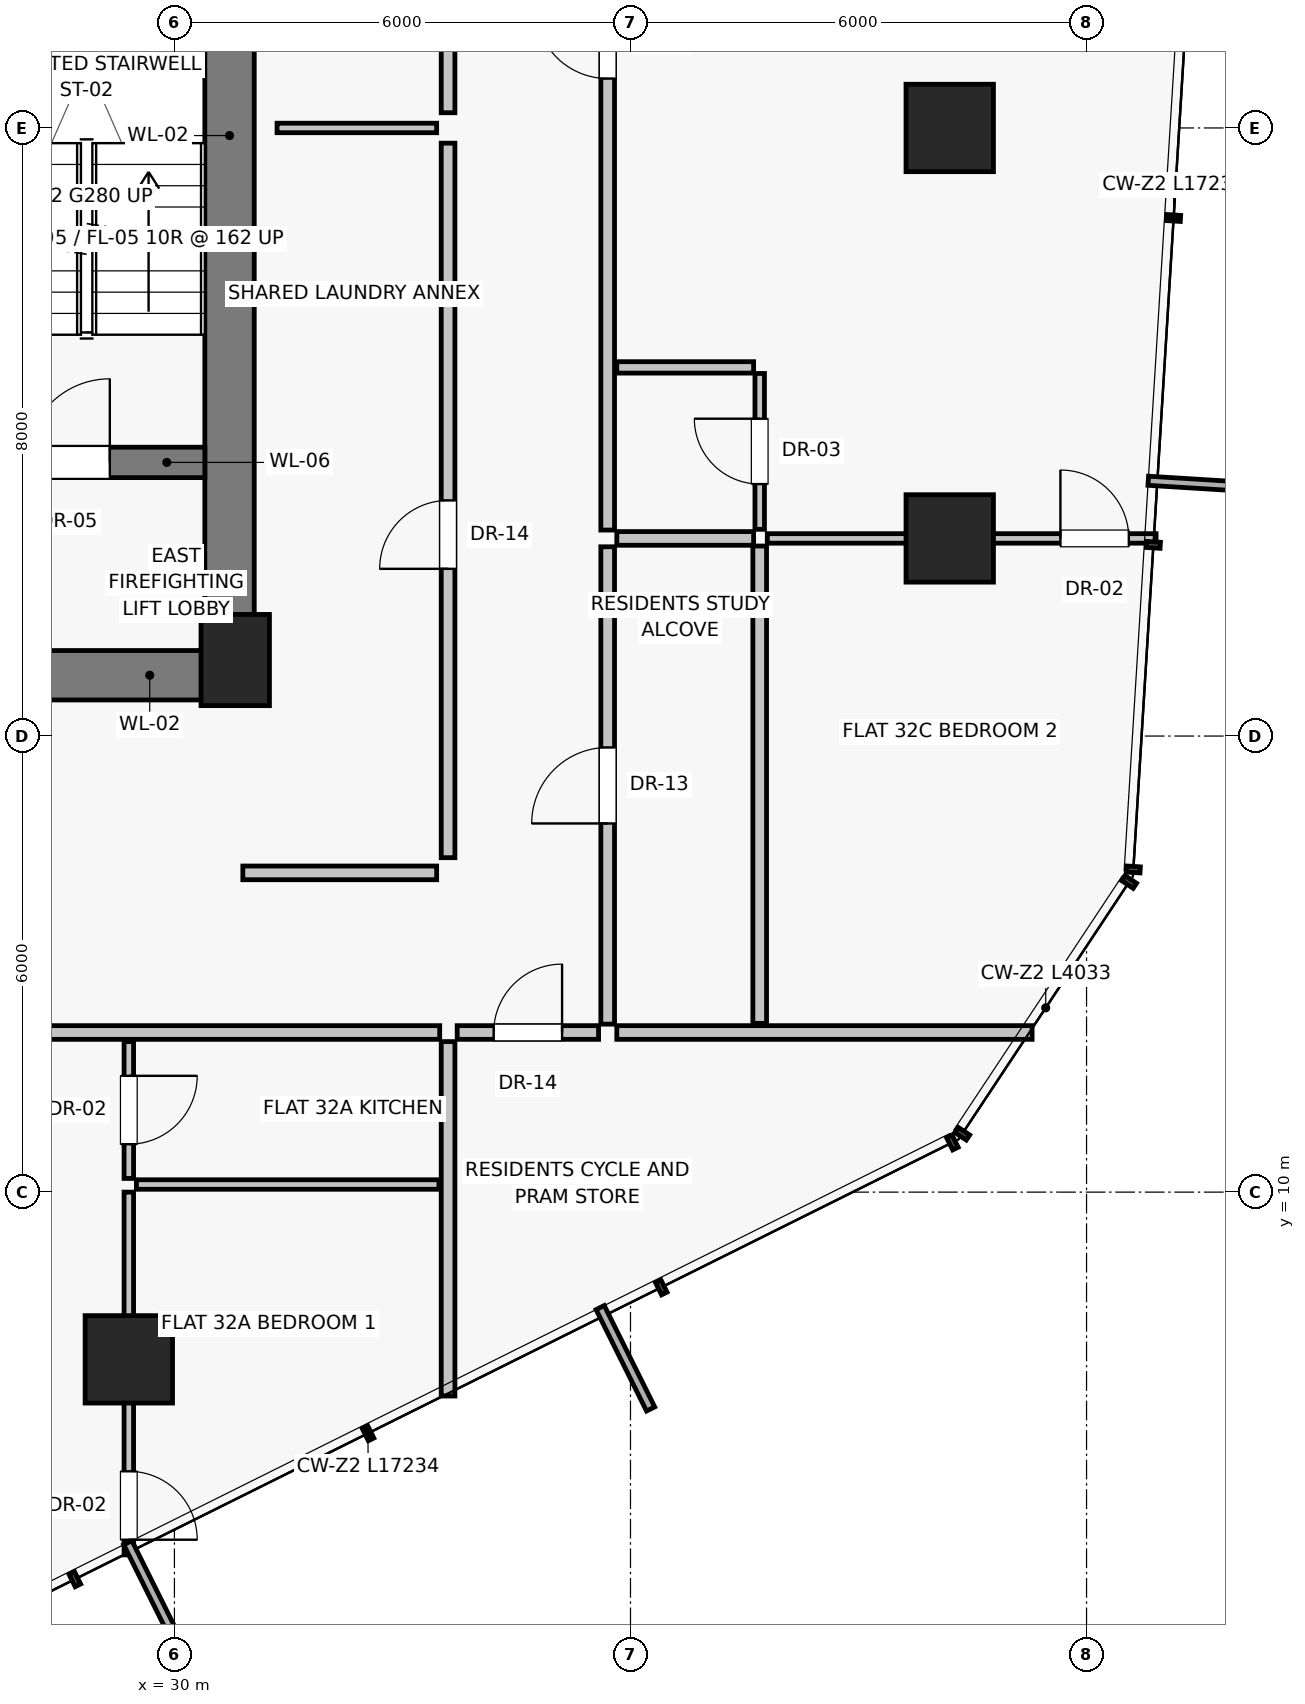
"""IFC4 building model, lengths in metres.
Left out: names, types, materials, properties, quantities, classifications, styles, units other than length and angle.
Written with IfcOpenShell. Run it as: python <this file> out.ifc"""

import sys

from ifc_helpers import new_model, si_unit, direction, frame, frame_2d, origin, origin_2d, place, context, subcontext, project, spatial, rectangle, extrude, source, transform, mapped, element, fill, save


model = new_model("IFC4")
c1 = context("Model", 3, precision=1e-05, world=origin(), true_north=direction((0.0, 1.0)))
c2 = subcontext(c1, "Body", "Model", "MODEL_VIEW")
j1 = project(units=[si_unit("LENGTHUNIT", "METRE"), si_unit("PLANEANGLEUNIT", "RADIAN")], contexts=[c1])
p1 = place(None, origin())
s1 = spatial("IfcSite", under=j1, at=p1, CompositionType="ELEMENT")
p2 = place(p1, origin())
s2 = spatial("IfcBuilding", under=s1, at=p2, CompositionType="ELEMENT")
p3 = place(p2, frame((0.0, 0.0, 116.5)))
s3 = spatial("IfcBuildingStorey", under=s2, at=p3, CompositionType="ELEMENT", Elevation=116.5)
p4 = place(p3, frame((30.8, 17.0, 0.0), z_axis=(0.0, 0.0, 1.0), x_axis=(1.0, 0.0, 0.0)))
e1 = element("IfcColumn", 1, at=p4, inside=s3, PredefinedType="PILASTER", context=c2, shape_type="SweptSolid", body=[
    extrude(rectangle(XDim=0.9, YDim=1.2, at=origin_2d()), origin(), (0.0, 0.0, 1.0), 3.25),
])
for number, where, z_axis, x_axis in (
    (2, (40.2, 18.6, 0.0), (0.0, 0.0, 1.0), (1.0, 0.0, 0.0)),
    (3, (40.2, 24.0, 0.0), (0.0, 0.0, 1.0), (1.0, 0.0, 0.0)),
    (4, (29.4, 7.8, 0.0), (0.0, 0.0, 1.0), (1.0, 0.0, 0.0)),
):
    element("IfcColumn", number, at=place(p3, frame(where, z_axis=z_axis, x_axis=x_axis)), inside=s3, PredefinedType="COLUMN", context=c2, shape_type="SweptSolid", body=[
        extrude(rectangle(XDim=1.15, YDim=1.15, at=origin_2d()), origin(), (0.0, 0.0, 1.0), 3.25),
    ])
p5 = place(p3, frame((30.725, 16.8, 0.0), z_axis=(0.0, 0.0, 1.0), x_axis=(0.0, 1.0, 0.0)))
e5 = element("IfcWall", 5, at=p5, inside=s3, PredefinedType="SHEAR", context=c2, shape_type="SweptSolid", body=[
    extrude(rectangle(XDim=14.2, YDim=0.65, at=frame_2d((7.1, 0.0))), origin(), (0.0, 0.0, 1.0), 3.0),
])
p6 = place(p3, frame((24.95, 16.8, 0.0), z_axis=(0.0, 0.0, 1.0), x_axis=(1.0, 0.0, 0.0)))
e6 = element("IfcWall", 6, at=p6, inside=s3, PredefinedType="SHEAR", context=c2, shape_type="SweptSolid", body=[
    extrude(rectangle(XDim=5.85, YDim=0.65, at=frame_2d((2.925, 0.0))), origin(), (0.0, 0.0, 1.0), 3.0),
])
p7 = place(p6, frame((2.15, 0.0, 0.0)))
e7 = element("IfcOpeningElement", 7, at=p7, cuts=e6, PredefinedType="OPENING", context=c2, shape_type="SweptSolid", body=[
    extrude(rectangle(XDim=1.2, YDim=2.03, at=frame_2d((0.6, 1.015))), frame((0.0, 0.335, 0.0), z_axis=(0.0, -1.0, 0.0), x_axis=(1.0, 0.0, 0.0)), (0.0, 0.0, 1.0), 0.67),
])
p8 = place(p3, frame((27.0, 19.6, 0.0), z_axis=(0.0, 0.0, 1.0), x_axis=(1.0, 0.0, 0.0)))
e8 = element("IfcWall", 8, at=p8, inside=s3, PredefinedType="SHEAR", context=c2, shape_type="SweptSolid", body=[
    extrude(rectangle(XDim=3.4, YDim=0.4, at=frame_2d((1.7, 0.0))), origin(), (0.0, 0.0, 1.0), 3.0),
])
p9 = place(p8, frame((1.05, 0.0, 0.0)))
e9 = element("IfcOpeningElement", 9, at=p9, cuts=e8, PredefinedType="OPENING", context=c2, shape_type="SweptSolid", body=[
    extrude(rectangle(XDim=1.1, YDim=2.03, at=frame_2d((0.55, 1.015))), frame((0.0, 0.21, 0.0), z_axis=(0.0, -1.0, 0.0), x_axis=(1.0, 0.0, 0.0)), (0.0, 0.0, 1.0), 0.42),
])
p10 = place(p3, frame((33.6, 14.4, 0.0), z_axis=(0.0, 0.0, 1.0), x_axis=(0.0, 1.0, 0.0)))
e10 = element("IfcWall", 10, at=p10, inside=s3, PredefinedType="PARTITIONING", context=c2, shape_type="SweptSolid", body=[
    extrude(rectangle(XDim=9.4, YDim=0.18, at=frame_2d((4.7, 0.0))), origin(), (0.0, 0.0, 1.0), 3.0),
])
p11 = place(p10, frame((3.8, 0.0, 0.0)))
e11 = element("IfcOpeningElement", 11, at=p11, cuts=e10, PredefinedType="OPENING", context=c2, shape_type="SweptSolid", body=[
    extrude(rectangle(XDim=0.9, YDim=2.01, at=frame_2d((0.45, 1.005))), frame((0.0, 0.1, 0.0), z_axis=(0.0, -1.0, 0.0), x_axis=(1.0, 0.0, 0.0)), (0.0, 0.0, 1.0), 0.2),
])
p12 = place(p3, frame((33.6, 24.2, 0.0), z_axis=(0.0, 0.0, 1.0), x_axis=(0.0, 1.0, 0.0)))
e12 = element("IfcWall", 12, at=p12, inside=s3, PredefinedType="PARTITIONING", context=c2, shape_type="SweptSolid", body=[
    extrude(rectangle(XDim=9.2, YDim=0.18, at=frame_2d((4.6, 0.0))), origin(), (0.0, 0.0, 1.0), 3.0),
])
p13 = place(p12, frame((3.8, 0.0, 0.0)))
e13 = element("IfcOpeningElement", 13, at=p13, cuts=e12, PredefinedType="OPENING", context=c2, shape_type="SweptSolid", body=[
    extrude(rectangle(XDim=0.9, YDim=2.01, at=frame_2d((0.45, 1.005))), frame((0.0, 0.1, 0.0), z_axis=(0.0, -1.0, 0.0), x_axis=(1.0, 0.0, 0.0)), (0.0, 0.0, 1.0), 0.2),
])
p14 = place(p3, frame((31.35, 24.0, 0.0), z_axis=(0.0, 0.0, 1.0), x_axis=(1.0, 0.0, 0.0)))
e14 = element("IfcWall", 14, at=p14, inside=s3, PredefinedType="PARTITIONING", context=c2, shape_type="SweptSolid", body=[
    extrude(rectangle(XDim=2.1, YDim=0.125, at=frame_2d((1.05, 0.0))), origin(), (0.0, 0.0, 1.0), 3.0),
])
p15 = place(p3, frame((30.9, 14.2, 0.0), z_axis=(0.0, 0.0, 1.0), x_axis=(1.0, 0.0, 0.0)))
e15 = element("IfcWall", 15, at=p15, inside=s3, PredefinedType="PARTITIONING", context=c2, shape_type="SweptSolid", body=[
    extrude(rectangle(XDim=2.55, YDim=0.18, at=frame_2d((1.275, 0.0))), origin(), (0.0, 0.0, 1.0), 3.0),
])
p16 = place(p3, frame((33.6, 11.98, 0.0), z_axis=(0.0, 0.0, 1.0), x_axis=(0.0, -1.0, 0.0)))
e16 = element("IfcWall", 16, at=p16, inside=s3, PredefinedType="PARTITIONING", context=c2, shape_type="SweptSolid", body=[
    extrude(rectangle(XDim=4.663, YDim=0.18, at=frame_2d((2.331, 0.0))), origin(), (0.0, 0.0, 1.0), 3.0),
])
p17 = place(p3, frame((18.71, 12.1, 0.0), z_axis=(0.0, 0.0, 1.0), x_axis=(1.0, 0.0, 0.0)))
e17 = element("IfcWall", 17, at=p17, inside=s3, PredefinedType="PARTITIONING", context=c2, shape_type="SweptSolid", body=[
    extrude(rectangle(XDim=14.78, YDim=0.18, at=frame_2d((7.39, 0.0))), origin(), (0.0, 0.0, 1.0), 2.58),
])
p18 = place(p17, frame((5.94, 0.0, 0.0)))
e18 = element("IfcOpeningElement", 18, at=p18, cuts=e17, PredefinedType="OPENING", context=c2, shape_type="SweptSolid", body=[
    extrude(rectangle(XDim=0.95, YDim=2.02, at=frame_2d((0.475, 1.01))), frame((0.0, 0.1, 0.0), z_axis=(0.0, -1.0, 0.0), x_axis=(1.0, 0.0, 0.0)), (0.0, 0.0, 1.0), 0.2),
])
p19 = place(p3, frame((29.4, 11.98, 0.0), z_axis=(0.0, 0.0, 1.0), x_axis=(0.0, -1.0, 0.0)))
e19 = element("IfcWall", 19, at=p19, inside=s3, PredefinedType="PARTITIONING", context=c2, shape_type="SweptSolid", body=[
    extrude(rectangle(XDim=1.8, YDim=0.125, at=frame_2d((0.9, 0.0))), origin(), (0.0, 0.0, 1.0), 2.378),
])
p20 = place(p19, frame((0.45, 0.0, 0.0)))
e20 = element("IfcOpeningElement", 20, at=p20, cuts=e19, PredefinedType="OPENING", context=c2, shape_type="SweptSolid", body=[
    extrude(rectangle(XDim=0.9, YDim=2.01, at=frame_2d((0.45, 1.005))), frame((0.0, 0.073, 0.0), z_axis=(0.0, -1.0, 0.0), x_axis=(1.0, 0.0, 0.0)), (0.0, 0.0, 1.0), 0.145),
])
p21 = place(p3, frame((29.5, 10.1, 0.0), z_axis=(0.0, 0.0, 1.0), x_axis=(1.0, 0.0, 0.0)))
e21 = element("IfcWall", 21, at=p21, inside=s3, PredefinedType="PARTITIONING", context=c2, shape_type="SweptSolid", body=[
    extrude(rectangle(XDim=3.98, YDim=0.125, at=frame_2d((1.99, 0.0))), origin(), (0.0, 0.0, 1.0), 3.0),
])
p22 = place(p3, frame((29.4, 10.0, 0.0), z_axis=(0.0, 0.0, 1.0), x_axis=(0.0, -1.0, 0.0)))
e22 = element("IfcWall", 22, at=p22, inside=s3, PredefinedType="PARTITIONING", context=c2, shape_type="SweptSolid", body=[
    extrude(rectangle(XDim=4.773, YDim=0.125, at=frame_2d((2.386, 0.0))), origin(), (0.0, 0.0, 1.0), 2.378),
])
p23 = place(p22, frame((3.673, 0.0, 0.0)))
e23 = element("IfcOpeningElement", 23, at=p23, cuts=e22, PredefinedType="OPENING", context=c2, shape_type="SweptSolid", body=[
    extrude(rectangle(XDim=0.9, YDim=2.01, at=frame_2d((0.45, 1.005))), frame((0.0, 0.073, 0.0), z_axis=(0.0, -1.0, 0.0), x_axis=(1.0, 0.0, 0.0)), (0.0, 0.0, 1.0), 0.145),
])
p24 = place(p3, frame((35.82, 12.1, 0.0), z_axis=(0.0, 0.0, 1.0), x_axis=(1.0, 0.0, 0.0)))
e24 = element("IfcWall", 24, at=p24, inside=s3, PredefinedType="PARTITIONING", context=c2, shape_type="SweptSolid", body=[
    extrude(rectangle(XDim=5.464, YDim=0.18, at=frame_2d((2.732, 0.0))), origin(), (0.0, 0.0, 1.0), 3.0),
])
p25 = place(p3, frame((35.7, 12.21, 0.0), z_axis=(0.0, 0.0, 1.0), x_axis=(0.0, 1.0, 0.0)))
e25 = element("IfcWall", 25, at=p25, inside=s3, PredefinedType="PARTITIONING", context=c2, shape_type="SweptSolid", body=[
    extrude(rectangle(XDim=6.28, YDim=0.18, at=frame_2d((3.14, 0.0))), origin(), (0.0, 0.0, 1.0), 2.58),
])
p26 = place(p25, frame((2.64, 0.0, 0.0)))
e26 = element("IfcOpeningElement", 26, at=p26, cuts=e25, PredefinedType="OPENING", context=c2, shape_type="SweptSolid", body=[
    extrude(rectangle(XDim=1.0, YDim=2.01, at=frame_2d((0.5, 1.005))), frame((0.0, 0.1, 0.0), z_axis=(0.0, -1.0, 0.0), x_axis=(1.0, 0.0, 0.0)), (0.0, 0.0, 1.0), 0.2),
])
p27 = place(p3, frame((35.7, 18.71, 0.0), z_axis=(0.0, 0.0, 1.0), x_axis=(0.0, 1.0, 0.0)))
e27 = element("IfcWall", 27, at=p27, inside=s3, PredefinedType="PARTITIONING", context=c2, shape_type="SweptSolid", body=[
    extrude(rectangle(XDim=16.88, YDim=0.18, at=frame_2d((8.44, 0.0))), origin(), (0.0, 0.0, 1.0), 2.58),
])
p28 = place(p27, frame((5.94, 0.0, 0.0)))
e28 = element("IfcOpeningElement", 28, at=p28, cuts=e27, PredefinedType="OPENING", context=c2, shape_type="SweptSolid", body=[
    extrude(rectangle(XDim=0.95, YDim=2.02, at=frame_2d((0.475, 1.01))), frame((0.0, 0.1, 0.0), z_axis=(0.0, -1.0, 0.0), x_axis=(1.0, 0.0, 0.0)), (0.0, 0.0, 1.0), 0.2),
])
p29 = place(p3, frame((37.7, 12.22, 0.0), z_axis=(0.0, 0.0, 1.0), x_axis=(0.0, 1.0, 0.0)))
e29 = element("IfcWall", 29, at=p29, inside=s3, PredefinedType="PARTITIONING", context=c2, shape_type="SweptSolid", body=[
    extrude(rectangle(XDim=6.28, YDim=0.18, at=frame_2d((3.14, 0.0))), origin(), (0.0, 0.0, 1.0), 3.0),
])
p30 = place(p3, frame((35.82, 18.6, 0.0), z_axis=(0.0, 0.0, 1.0), x_axis=(1.0, 0.0, 0.0)))
e30 = element("IfcWall", 30, at=p30, inside=s3, PredefinedType="PARTITIONING", context=c2, shape_type="SweptSolid", body=[
    extrude(rectangle(XDim=1.8, YDim=0.18, at=frame_2d((0.9, 0.0))), origin(), (0.0, 0.0, 1.0), 2.378),
])
p31 = place(p3, frame((37.8, 18.6, 0.0), z_axis=(0.0, 0.0, 1.0), x_axis=(1.0, 0.0, 0.0)))
e31 = element("IfcWall", 31, at=p31, inside=s3, PredefinedType="PARTITIONING", context=c2, shape_type="SweptSolid", body=[
    extrude(rectangle(XDim=5.115, YDim=0.125, at=frame_2d((2.558, 0.0))), origin(), (0.0, 0.0, 1.0), 2.378),
])
p32 = place(p31, frame((3.856, 0.0, 0.0)))
e32 = element("IfcOpeningElement", 32, at=p32, cuts=e31, PredefinedType="OPENING", context=c2, shape_type="SweptSolid", body=[
    extrude(rectangle(XDim=0.9, YDim=2.01, at=frame_2d((0.45, 1.005))), frame((0.0, 0.073, 0.0), z_axis=(0.0, -1.0, 0.0), x_axis=(1.0, 0.0, 0.0)), (0.0, 0.0, 1.0), 0.145),
])
p33 = place(p3, frame((35.82, 20.85, 0.0), z_axis=(0.0, 0.0, 1.0), x_axis=(1.0, 0.0, 0.0)))
e33 = element("IfcWall", 33, at=p33, inside=s3, PredefinedType="PARTITIONING", context=c2, shape_type="SweptSolid", body=[
    extrude(rectangle(XDim=1.8, YDim=0.15, at=frame_2d((0.9, 0.0))), origin(), (0.0, 0.0, 1.0), 3.0),
])
p34 = place(p3, frame((37.7, 18.72, 0.0), z_axis=(0.0, 0.0, 1.0), x_axis=(0.0, 1.0, 0.0)))
e34 = element("IfcWall", 34, at=p34, inside=s3, PredefinedType="PARTITIONING", context=c2, shape_type="SweptSolid", body=[
    extrude(rectangle(XDim=2.05, YDim=0.125, at=frame_2d((1.025, 0.0))), origin(), (0.0, 0.0, 1.0), 3.0),
])
p35 = place(p34, frame((0.595, 0.0, 0.0)))
e35 = element("IfcOpeningElement", 35, at=p35, cuts=e34, PredefinedType="OPENING", context=c2, shape_type="SweptSolid", body=[
    extrude(rectangle(XDim=0.86, YDim=2.01, at=frame_2d((0.43, 1.005))), frame((0.0, 0.073, 0.0), z_axis=(0.0, -1.0, 0.0), x_axis=(1.0, 0.0, 0.0)), (0.0, 0.0, 1.0), 0.145),
])
p36 = place(p3, frame((33.72, 12.1, 0.0), z_axis=(0.0, 0.0, 1.0), x_axis=(1.0, 0.0, 0.0)))
e36 = element("IfcWall", 36, at=p36, inside=s3, PredefinedType="PARTITIONING", context=c2, shape_type="SweptSolid", body=[
    extrude(rectangle(XDim=1.86, YDim=0.18, at=frame_2d((0.93, 0.0))), origin(), (0.0, 0.0, 1.0), 3.0),
])
p37 = place(p36, frame((0.48, 0.0, 0.0)))
e37 = element("IfcOpeningElement", 37, at=p37, cuts=e36, PredefinedType="OPENING", context=c2, shape_type="SweptSolid", body=[
    extrude(rectangle(XDim=0.9, YDim=2.01, at=frame_2d((0.45, 1.005))), frame((0.0, 0.1, 0.0), z_axis=(0.0, -1.0, 0.0), x_axis=(1.0, 0.0, 0.0)), (0.0, 0.0, 1.0), 0.2),
])
m1 = source(origin(), c2, "Body", "SweptSolid", [
    extrude(rectangle(XDim=1.1, YDim=2.03, at=frame_2d((0.55, 1.015))), frame((0.0, 0.025, 0.0), z_axis=(0.0, -1.0, 0.0), x_axis=(1.0, 0.0, 0.0)), (0.0, 0.0, 1.0), 0.05),
])
p38 = place(p9, origin())
e38 = element("IfcDoor", 38, at=p38, inside=s3, OperationType="SINGLE_SWING_RIGHT", PredefinedType="DOOR", context=c2, shape_type="MappedRepresentation", body=[
    mapped(m1, transform((0.0, 0.0, 0.0), scale=1.0)),
])
fill(e9, e38)
m2 = source(origin(), c2, "Body", "SweptSolid", [
    extrude(rectangle(XDim=0.9, YDim=2.01, at=frame_2d((0.45, 1.005))), frame((0.0, 0.025, 0.0), z_axis=(0.0, -1.0, 0.0), x_axis=(1.0, 0.0, 0.0)), (0.0, 0.0, 1.0), 0.05),
])
p39 = place(p11, origin())
e39 = element("IfcDoor", 39, at=p39, inside=s3, OperationType="SINGLE_SWING_LEFT", PredefinedType="DOOR", context=c2, shape_type="MappedRepresentation", body=[
    mapped(m2, transform((0.0, 0.0, 0.0), scale=1.0)),
])
fill(e11, e39)
p40 = place(p20, origin())
e40 = element("IfcDoor", 40, at=p40, inside=s3, OperationType="SINGLE_SWING_LEFT", PredefinedType="DOOR", context=c2, shape_type="MappedRepresentation", body=[
    mapped(m2, transform((0.0, 0.0, 0.0), scale=1.0)),
])
fill(e20, e40)
p41 = place(p23, origin())
e41 = element("IfcDoor", 41, at=p41, inside=s3, OperationType="SINGLE_SWING_RIGHT", PredefinedType="DOOR", context=c2, shape_type="MappedRepresentation", body=[
    mapped(m2, transform((0.0, 0.0, 0.0), scale=1.0)),
])
fill(e23, e41)
m3 = source(origin(), c2, "Body", "SweptSolid", [
    extrude(rectangle(XDim=1.0, YDim=2.01, at=frame_2d((0.5, 1.005))), frame((0.0, 0.025, 0.0), z_axis=(0.0, -1.0, 0.0), x_axis=(1.0, 0.0, 0.0)), (0.0, 0.0, 1.0), 0.05),
])
p42 = place(p26, origin())
e42 = element("IfcDoor", 42, at=p42, inside=s3, OperationType="SINGLE_SWING_LEFT", PredefinedType="DOOR", context=c2, shape_type="MappedRepresentation", body=[
    mapped(m3, transform((0.0, 0.0, 0.0), scale=1.0)),
])
fill(e26, e42)
m4 = source(origin(), c2, "Body", "SweptSolid", [
    extrude(rectangle(XDim=0.95, YDim=2.02, at=frame_2d((0.475, 1.01))), frame((0.0, 0.025, 0.0), z_axis=(0.0, -1.0, 0.0), x_axis=(1.0, 0.0, 0.0)), (0.0, 0.0, 1.0), 0.05),
])
p43 = place(p28, origin())
e43 = element("IfcDoor", 43, at=p43, inside=s3, OperationType="SINGLE_SWING_RIGHT", PredefinedType="DOOR", context=c2, shape_type="MappedRepresentation", body=[
    mapped(m4, transform((0.0, 0.0, 0.0), scale=1.0)),
])
fill(e28, e43)
p44 = place(p32, origin())
e44 = element("IfcDoor", 44, at=p44, inside=s3, OperationType="SINGLE_SWING_LEFT", PredefinedType="DOOR", context=c2, shape_type="MappedRepresentation", body=[
    mapped(m2, transform((0.0, 0.0, 0.0), scale=1.0)),
])
fill(e32, e44)
m5 = source(origin(), c2, "Body", "SweptSolid", [
    extrude(rectangle(XDim=0.86, YDim=2.01, at=frame_2d((0.43, 1.005))), frame((0.0, 0.025, 0.0), z_axis=(0.0, -1.0, 0.0), x_axis=(1.0, 0.0, 0.0)), (0.0, 0.0, 1.0), 0.05),
])
p45 = place(p35, origin())
e45 = element("IfcDoor", 45, at=p45, inside=s3, OperationType="SINGLE_SWING_RIGHT", PredefinedType="DOOR", context=c2, shape_type="MappedRepresentation", body=[
    mapped(m5, transform((0.0, 0.0, 0.0), scale=1.0)),
])
fill(e35, e45)
p46 = place(p37, origin())
e46 = element("IfcDoor", 46, at=p46, inside=s3, OperationType="SINGLE_SWING_RIGHT", PredefinedType="DOOR", context=c2, shape_type="MappedRepresentation", body=[
    mapped(m2, transform((0.0, 0.0, 0.0), scale=1.0)),
])
fill(e37, e46)
save(model, sys.argv[1])
